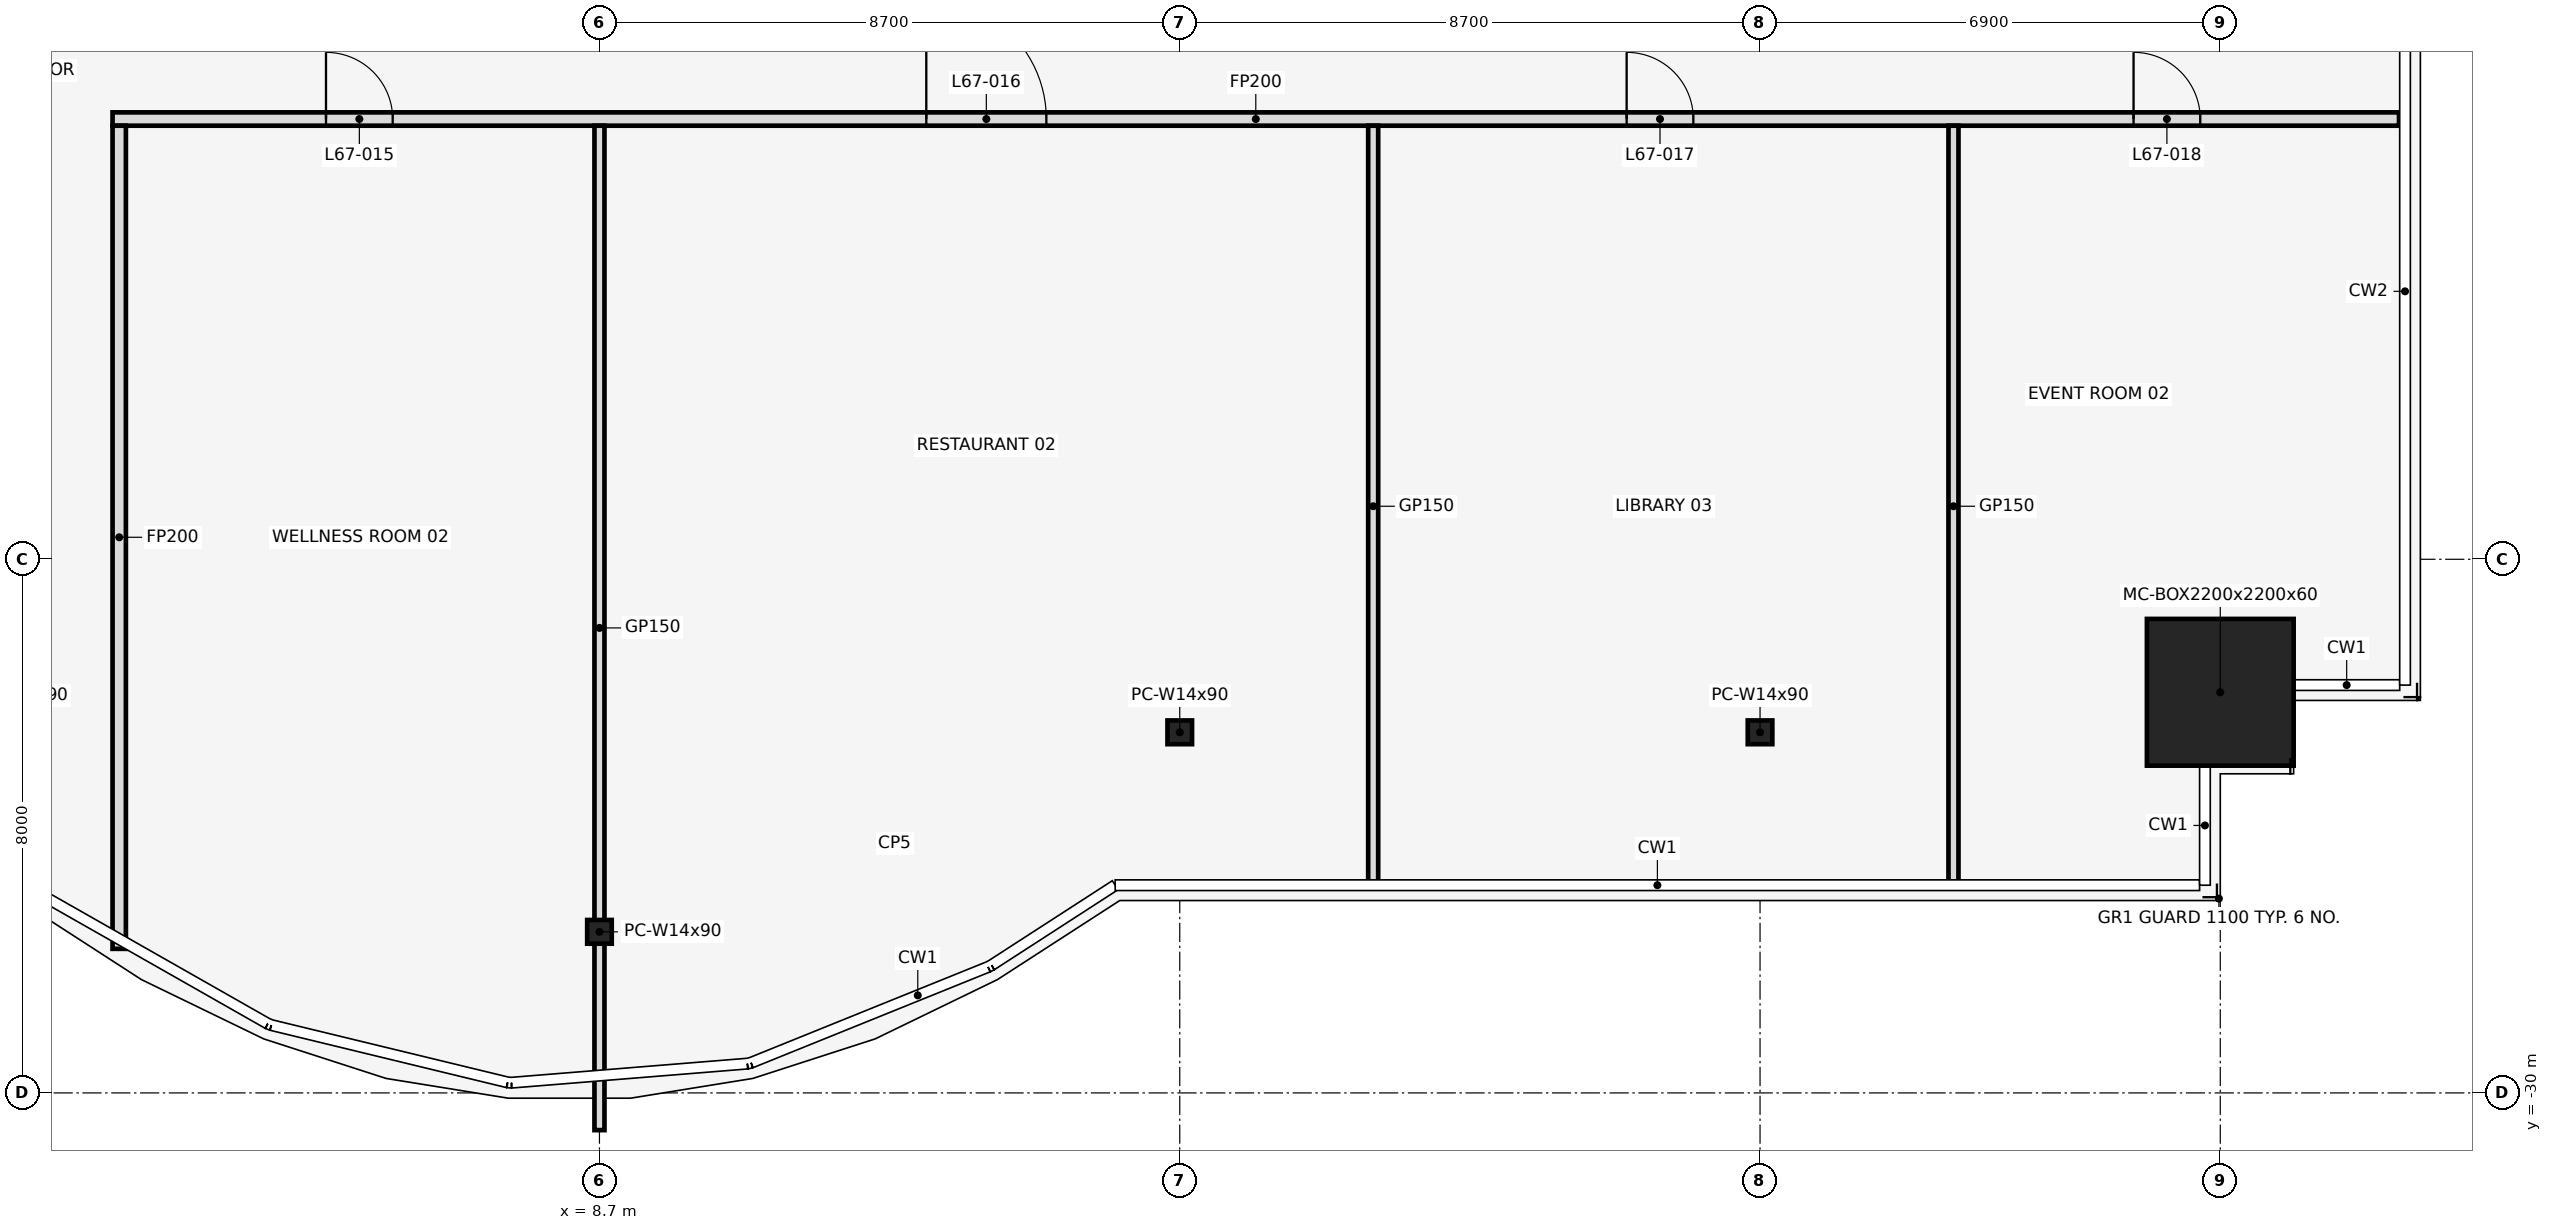
"""IFC4 building model, lengths in metres.
Left out: names, types, materials, properties, quantities, classifications, styles, units other than length and angle.
Written with IfcOpenShell. Run it as: python <this file> out.ifc"""

import sys

from ifc_helpers import new_model, si_unit, direction, frame, frame_2d, origin, origin_2d, place, context, subcontext, project, spatial, rectangle, hollow_rectangle, i_section, extrude, element, fill, save


model = new_model("IFC4")
c1 = context("Model", 3, precision=1e-05, world=origin(), true_north=direction((0.0, 1.0)))
c2 = subcontext(c1, "Body", "Model", "MODEL_VIEW")
j1 = project(units=[si_unit("LENGTHUNIT", "METRE"), si_unit("PLANEANGLEUNIT", "RADIAN")], contexts=[c1])
p1 = place(None, origin())
s1 = spatial("IfcSite", under=j1, at=p1, CompositionType="ELEMENT")
p2 = place(p1, origin())
s2 = spatial("IfcBuilding", under=s1, at=p2, CompositionType="ELEMENT")
p3 = place(p2, frame((0.0, 0.0, 297.5)))
s3 = spatial("IfcBuildingStorey", under=s2, at=p3, CompositionType="ELEMENT", Elevation=297.5)
for number, where, z_axis, x_axis in (
    (1, (8.7, -27.585, 0.0), (0.0, 0.0, 1.0), (1.0, 0.0, 0.0)),
    (2, (17.4, -24.594, 0.0), (0.0, 0.0, 1.0), (1.0, 0.0, 0.0)),
    (3, (26.1, -24.594, 0.0), (0.0, 0.0, 1.0), (1.0, 0.0, 0.0)),
):
    element("IfcColumn", number, at=place(p3, frame(where, z_axis=z_axis, x_axis=x_axis)), inside=s3, PredefinedType="COLUMN", context=c2, shape_type="SweptSolid", body=[
        extrude(i_section(OverallWidth=0.368, OverallDepth=0.356, WebThickness=0.011, FlangeThickness=0.018, at=origin_2d()), origin(), (0.0, 0.0, 1.0), 4.5),
    ])
p4 = place(p3, frame((33.0, -23.994, 0.0), z_axis=(0.0, 0.0, 1.0), x_axis=(1.0, 0.0, 0.0)))
e4 = element("IfcColumn", 4, at=p4, inside=s3, PredefinedType="COLUMN", context=c2, shape_type="SweptSolid", body=[
    extrude(hollow_rectangle(XDim=2.2, YDim=2.2, WallThickness=0.06, at=origin_2d()), origin(), (0.0, 0.0, 1.0), 4.5),
])
p5 = place(p3, frame((1.4, -15.4, 0.0), z_axis=(0.0, 0.0, 1.0), x_axis=(1.0, 0.0, 0.0)))
e5 = element("IfcWall", 5, at=p5, inside=s3, PredefinedType="PARTITIONING", context=c2, shape_type="SweptSolid", body=[
    extrude(rectangle(XDim=34.28, YDim=0.2, at=frame_2d((17.14, 0.0))), origin(), (0.0, 0.0, 1.0), 3.418),
])
p6 = place(p5, frame((3.2, 0.0, 0.0)))
e6 = element("IfcOpeningElement", 6, at=p6, cuts=e5, PredefinedType="OPENING", context=c2, shape_type="SweptSolid", body=[
    extrude(rectangle(XDim=1.0, YDim=2.1, at=frame_2d((0.5, 1.05))), frame((0.0, 0.112, 0.0), z_axis=(0.0, -1.0, 0.0), x_axis=(1.0, 0.0, 0.0)), (0.0, 0.0, 1.0), 0.224),
])
p7 = place(p5, frame((12.2, 0.0, 0.0)))
e7 = element("IfcOpeningElement", 7, at=p7, cuts=e5, PredefinedType="OPENING", context=c2, shape_type="SweptSolid", body=[
    extrude(rectangle(XDim=1.8, YDim=2.1, at=frame_2d((0.9, 1.05))), frame((0.0, 0.112, 0.0), z_axis=(0.0, -1.0, 0.0), x_axis=(1.0, 0.0, 0.0)), (0.0, 0.0, 1.0), 0.224),
])
p8 = place(p5, frame((22.7, 0.0, 0.0)))
e8 = element("IfcOpeningElement", 8, at=p8, cuts=e5, PredefinedType="OPENING", context=c2, shape_type="SweptSolid", body=[
    extrude(rectangle(XDim=1.0, YDim=2.1, at=frame_2d((0.5, 1.05))), frame((0.0, 0.112, 0.0), z_axis=(0.0, -1.0, 0.0), x_axis=(1.0, 0.0, 0.0)), (0.0, 0.0, 1.0), 0.224),
])
p9 = place(p5, frame((30.3, 0.0, 0.0)))
e9 = element("IfcOpeningElement", 9, at=p9, cuts=e5, PredefinedType="OPENING", context=c2, shape_type="SweptSolid", body=[
    extrude(rectangle(XDim=1.0, YDim=2.1, at=frame_2d((0.5, 1.05))), frame((0.0, 0.112, 0.0), z_axis=(0.0, -1.0, 0.0), x_axis=(1.0, 0.0, 0.0)), (0.0, 0.0, 1.0), 0.224),
])
p10 = place(p3, frame((1.5, -27.84, 0.0), z_axis=(0.0, 0.0, 1.0), x_axis=(0.0, 1.0, 0.0)))
e10 = element("IfcWall", 10, at=p10, inside=s3, PredefinedType="PARTITIONING", context=c2, shape_type="SweptSolid", body=[
    extrude(rectangle(XDim=12.34, YDim=0.2, at=frame_2d((6.17, 0.0))), origin(), (0.0, 0.0, 1.0), 3.418),
])
p11 = place(p3, frame((8.7, -30.558, 0.0), z_axis=(0.0, 0.0, 1.0), x_axis=(0.0, 1.0, 0.0)))
e11 = element("IfcWall", 11, at=p11, inside=s3, PredefinedType="PARTITIONING", context=c2, shape_type="SweptSolid", body=[
    extrude(rectangle(XDim=15.058, YDim=0.15, at=frame_2d((7.529, 0.0))), origin(), (0.0, 0.0, 1.0), 3.418),
])
for number, where, z_axis, x_axis in (
    (12, (20.3, -26.91, 0.0), (0.0, 0.0, 1.0), (0.0, 1.0, 0.0)),
    (13, (29.0, -26.91, 0.0), (0.0, 0.0, 1.0), (0.0, 1.0, 0.0)),
):
    element("IfcWall", number, at=place(p3, frame(where, z_axis=z_axis, x_axis=x_axis)), inside=s3, PredefinedType="PARTITIONING", context=c2, shape_type="SweptSolid", body=[
        extrude(rectangle(XDim=11.41, YDim=0.15, at=frame_2d((5.705, 0.0))), origin(), (0.0, 0.0, 1.0), 3.418),
    ])
p12 = place(p6, frame((1.0, 0.0, 0.0), z_axis=(0.0, 0.0, 1.0), x_axis=(-1.0, 0.0, 0.0)))
e14 = element("IfcDoor", 14, at=p12, inside=s3, OperationType="SINGLE_SWING_RIGHT", PredefinedType="DOOR", context=c2, shape_type="SweptSolid", body=[
    extrude(rectangle(XDim=1.0, YDim=2.1, at=frame_2d((0.5, 1.05))), frame((0.0, 0.025, 0.0), z_axis=(0.0, -1.0, 0.0), x_axis=(1.0, 0.0, 0.0)), (0.0, 0.0, 1.0), 0.05),
])
fill(e6, e14)
p13 = place(p7, origin())
e15 = element("IfcDoor", 15, at=p13, inside=s3, OperationType="SINGLE_SWING_LEFT", PredefinedType="DOOR", context=c2, shape_type="SweptSolid", body=[
    extrude(rectangle(XDim=1.8, YDim=2.1, at=frame_2d((0.9, 1.05))), frame((0.0, 0.025, 0.0), z_axis=(0.0, -1.0, 0.0), x_axis=(1.0, 0.0, 0.0)), (0.0, 0.0, 1.0), 0.05),
])
fill(e7, e15)
p14 = place(p8, frame((1.0, 0.0, 0.0), z_axis=(0.0, 0.0, 1.0), x_axis=(-1.0, 0.0, 0.0)))
e16 = element("IfcDoor", 16, at=p14, inside=s3, OperationType="SINGLE_SWING_RIGHT", PredefinedType="DOOR", context=c2, shape_type="SweptSolid", body=[
    extrude(rectangle(XDim=1.0, YDim=2.1, at=frame_2d((0.5, 1.05))), frame((0.0, 0.025, 0.0), z_axis=(0.0, -1.0, 0.0), x_axis=(1.0, 0.0, 0.0)), (0.0, 0.0, 1.0), 0.05),
])
fill(e8, e16)
p15 = place(p9, frame((1.0, 0.0, 0.0), z_axis=(0.0, 0.0, 1.0), x_axis=(-1.0, 0.0, 0.0)))
e17 = element("IfcDoor", 17, at=p15, inside=s3, OperationType="SINGLE_SWING_RIGHT", PredefinedType="DOOR", context=c2, shape_type="SweptSolid", body=[
    extrude(rectangle(XDim=1.0, YDim=2.1, at=frame_2d((0.5, 1.05))), frame((0.0, 0.025, 0.0), z_axis=(0.0, -1.0, 0.0), x_axis=(1.0, 0.0, 0.0)), (0.0, 0.0, 1.0), 0.05),
])
fill(e9, e17)
save(model, sys.argv[1])
